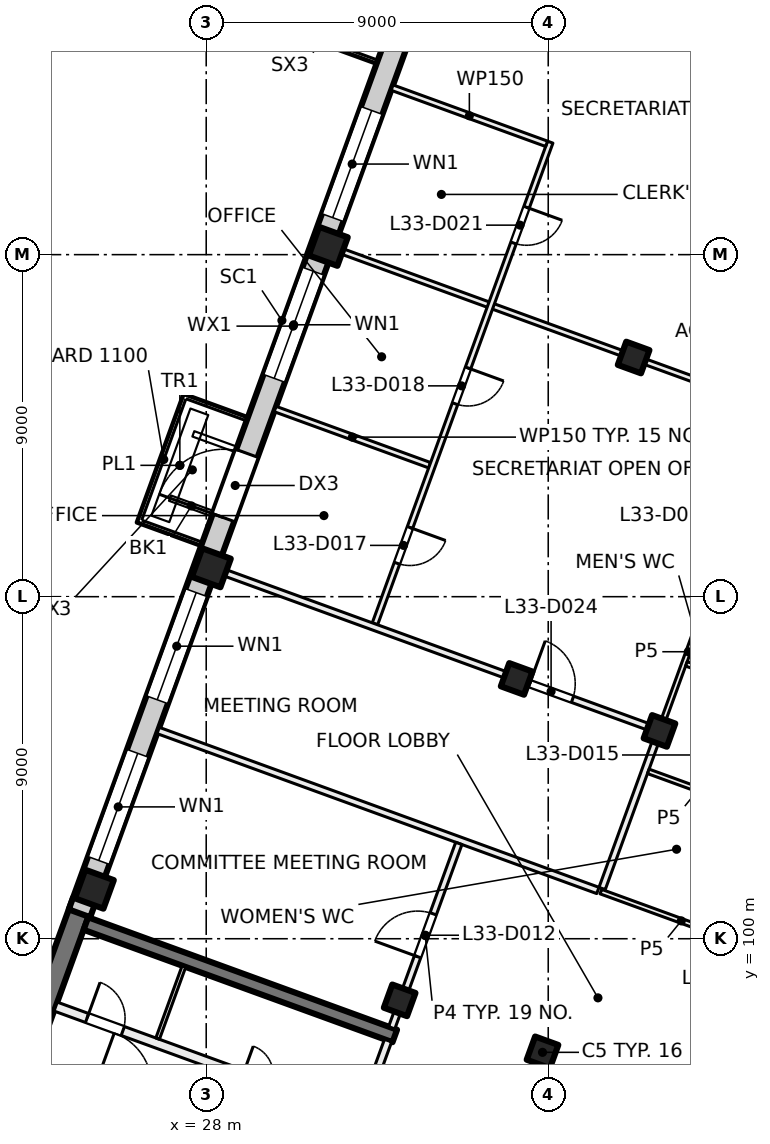
"""IFC4 building model, lengths in metres.
Left out: names, types, materials, properties, quantities, classifications, styles, units other than length and angle.
Written with IfcOpenShell. Run it as: python <this file> out.ifc"""

import sys

from ifc_helpers import new_model, si_unit, direction, frame, frame_2d, origin, origin_2d, place, context, subcontext, project, spatial, rectangle, extrude, element, fill, save


model = new_model("IFC4")
c1 = context("Model", 3, precision=1e-05, world=origin(), true_north=direction((0.0, 1.0)))
c2 = subcontext(c1, "Body", "Model", "MODEL_VIEW")
j1 = project(units=[si_unit("LENGTHUNIT", "METRE"), si_unit("PLANEANGLEUNIT", "RADIAN")], contexts=[c1])
p1 = place(None, origin())
s1 = spatial("IfcSite", under=j1, at=p1, CompositionType="ELEMENT")
p2 = place(p1, origin())
s2 = spatial("IfcBuilding", under=s1, at=p2, CompositionType="ELEMENT")
p3 = place(p2, frame((0.0, 0.0, 142.5)))
s3 = spatial("IfcBuildingStorey", under=s2, at=p3, CompositionType="ELEMENT", Elevation=142.5)
for number, where, z_axis, x_axis in (
    (1, (39.927, 105.468, 0.0), (0.0, 0.0, 1.0), (-0.342, -0.94, 0.0)),
    (2, (36.849, 97.011, 0.0), (0.0, 0.0, 1.0), (-0.342, -0.94, 0.0)),
    (3, (39.247, 115.293, 0.0), (0.0, 0.0, 1.0), (-0.342, -0.94, 0.0)),
    (4, (36.169, 106.836, 0.0), (0.0, 0.0, 1.0), (-0.342, -0.94, 0.0)),
    (5, (33.091, 98.379, 0.0), (0.0, 0.0, 1.0), (-0.342, -0.94, 0.0)),
):
    element("IfcColumn", number, at=place(p3, frame(where, z_axis=z_axis, x_axis=x_axis)), inside=s3, PredefinedType="COLUMN", context=c2, shape_type="SweptSolid", body=[
        extrude(rectangle(XDim=0.65, YDim=0.65, at=origin_2d()), origin(), (0.0, 0.0, 1.0), 4.0),
    ])
for number, where, z_axis, x_axis in (
    (6, (31.212, 118.218, 0.0), (0.0, 0.0, 1.0), (-0.342, -0.94, 0.0)),
    (7, (28.134, 109.76, 0.0), (0.0, 0.0, 1.0), (-0.342, -0.94, 0.0)),
    (8, (25.056, 101.303, 0.0), (0.0, 0.0, 1.0), (-0.342, -0.94, 0.0)),
):
    element("IfcColumn", number, at=place(p3, frame(where, z_axis=z_axis, x_axis=x_axis)), inside=s3, PredefinedType="COLUMN", context=c2, shape_type="SweptSolid", body=[
        extrude(rectangle(XDim=0.8, YDim=0.8, at=origin_2d()), origin(), (0.0, 0.0, 1.0), 4.0),
    ])
p4 = place(p3, frame((21.694, 92.577, 0.0), z_axis=(0.0, 0.0, 1.0), x_axis=(0.342010253184, 0.939696220444, 0.0)))
e9 = element("IfcWall", 9, at=p4, inside=s3, PredefinedType="SHEAR", context=c2, shape_type="SweptSolid", body=[
    extrude(rectangle(XDim=8.95, YDim=0.55, at=frame_2d((4.475, 0.0))), origin(), (0.0, 0.0, 1.0), 4.0),
])
p5 = place(p3, frame((32.962, 97.441, 0.0), z_axis=(0.0, 0.0, 1.0), x_axis=(-0.939689545667, 0.342028592028, 0.0)))
e10 = element("IfcWall", 10, at=p5, inside=s3, PredefinedType="SHEAR", context=c2, shape_type="SweptSolid", body=[
    extrude(rectangle(XDim=8.65, YDim=0.35, at=frame_2d((4.325, 0.0))), origin(), (0.0, 0.0, 1.0), 4.0),
])
p6 = place(p3, frame((24.666, 100.669, 0.0), z_axis=(0.0, 0.0, 1.0), x_axis=(0.34201964167, 0.939692803373, 0.0)))
e11 = element("IfcWall", 11, at=p6, inside=s3, PredefinedType="SOLIDWALL", context=c2, shape_type="SweptSolid", body=[
    extrude(rectangle(XDim=32.884, YDim=0.6, at=frame_2d((16.442, 0.0))), origin(), (0.0, 0.0, 1.0), 3.625),
])
p7 = place(p6, frame((1.48, 0.0, 0.9)))
e12 = element("IfcOpeningElement", 12, at=p7, cuts=e11, PredefinedType="OPENING", context=c2, shape_type="SweptSolid", body=[
    extrude(rectangle(XDim=3.0, YDim=2.4, at=frame_2d((1.5, 1.2))), frame((0.0, 0.31, 0.0), z_axis=(0.0, -1.0, 0.0), x_axis=(1.0, 0.0, 0.0)), (0.0, 0.0, 1.0), 0.62),
])
p8 = place(p6, frame((5.98, 0.0, 0.9)))
e13 = element("IfcOpeningElement", 13, at=p8, cuts=e11, PredefinedType="OPENING", context=c2, shape_type="SweptSolid", body=[
    extrude(rectangle(XDim=3.0, YDim=2.4, at=frame_2d((1.5, 1.2))), frame((0.0, 0.31, 0.0), z_axis=(0.0, -1.0, 0.0), x_axis=(1.0, 0.0, 0.0)), (0.0, 0.0, 1.0), 0.62),
])
p9 = place(p6, frame((11.08, 0.0, 0.0)))
e14 = element("IfcOpeningElement", 14, at=p9, cuts=e11, PredefinedType="OPENING", context=c2, shape_type="SweptSolid", body=[
    extrude(rectangle(XDim=1.8, YDim=2.4, at=frame_2d((0.9, 1.2))), frame((0.0, 0.31, 0.0), z_axis=(0.0, -1.0, 0.0), x_axis=(1.0, 0.0, 0.0)), (0.0, 0.0, 1.0), 0.62),
])
p10 = place(p6, frame((14.98, 0.0, 0.9)))
e15 = element("IfcOpeningElement", 15, at=p10, cuts=e11, PredefinedType="OPENING", context=c2, shape_type="SweptSolid", body=[
    extrude(rectangle(XDim=3.0, YDim=2.4, at=frame_2d((1.5, 1.2))), frame((0.0, 0.31, 0.0), z_axis=(0.0, -1.0, 0.0), x_axis=(1.0, 0.0, 0.0)), (0.0, 0.0, 1.0), 0.62),
])
p11 = place(p6, frame((19.48, 0.0, 0.9)))
e16 = element("IfcOpeningElement", 16, at=p11, cuts=e11, PredefinedType="OPENING", context=c2, shape_type="SweptSolid", body=[
    extrude(rectangle(XDim=3.0, YDim=2.4, at=frame_2d((1.5, 1.2))), frame((0.0, 0.31, 0.0), z_axis=(0.0, -1.0, 0.0), x_axis=(1.0, 0.0, 0.0)), (0.0, 0.0, 1.0), 0.62),
])
p12 = place(p6, frame((24.58, 0.0, 0.0)))
e17 = element("IfcOpeningElement", 17, at=p12, cuts=e11, PredefinedType="OPENING", context=c2, shape_type="SweptSolid", body=[
    extrude(rectangle(XDim=1.8, YDim=2.4, at=frame_2d((0.9, 1.2))), frame((0.0, 0.31, 0.0), z_axis=(0.0, -1.0, 0.0), x_axis=(1.0, 0.0, 0.0)), (0.0, 0.0, 1.0), 0.62),
])
p13 = place(p6, frame((28.48, 0.0, 0.9)))
e18 = element("IfcOpeningElement", 18, at=p13, cuts=e11, PredefinedType="OPENING", context=c2, shape_type="SweptSolid", body=[
    extrude(rectangle(XDim=3.0, YDim=2.4, at=frame_2d((1.5, 1.2))), frame((0.0, 0.31, 0.0), z_axis=(0.0, -1.0, 0.0), x_axis=(1.0, 0.0, 0.0)), (0.0, 0.0, 1.0), 0.62),
])
p14 = place(p3, frame((31.459, 93.678, 0.0), z_axis=(0.0, 0.0, 1.0), x_axis=(0.341985870128, 0.939705094502, 0.0)))
e19 = element("IfcWall", 19, at=p14, inside=s3, PredefinedType="PARTITIONING", context=c2, shape_type="SweptSolid", body=[
    extrude(rectangle(XDim=3.875, YDim=0.2, at=frame_2d((1.938, 0.0))), origin(), (0.0, 0.0, 1.0), 3.625),
])
p15 = place(p14, frame((0.3, 0.0, 0.0)))
e20 = element("IfcOpeningElement", 20, at=p15, cuts=e19, PredefinedType="OPENING", context=c2, shape_type="SweptSolid", body=[
    extrude(rectangle(XDim=1.2, YDim=2.1, at=frame_2d((0.6, 1.05))), frame((0.0, 0.11, 0.0), z_axis=(0.0, -1.0, 0.0), x_axis=(1.0, 0.0, 0.0)), (0.0, 0.0, 1.0), 0.22),
])
p16 = place(p3, frame((23.483, 96.688, 0.0), z_axis=(0.0, 0.0, 1.0), x_axis=(0.939691007314, -0.342024576271, 0.0)))
e21 = element("IfcWall", 21, at=p16, inside=s3, PredefinedType="PARTITIONING", context=c2, shape_type="SweptSolid", body=[
    extrude(rectangle(XDim=8.425, YDim=0.2, at=frame_2d((4.212, 0.0))), origin(), (0.0, 0.0, 1.0), 3.625),
])
p17 = place(p16, frame((1.688, 0.0, 0.0)))
e22 = element("IfcOpeningElement", 22, at=p17, cuts=e21, PredefinedType="OPENING", context=c2, shape_type="SweptSolid", body=[
    extrude(rectangle(XDim=1.5, YDim=2.1, at=frame_2d((0.75, 1.05))), frame((0.0, 0.11, 0.0), z_axis=(0.0, -1.0, 0.0), x_axis=(1.0, 0.0, 0.0)), (0.0, 0.0, 1.0), 0.22),
])
p18 = place(p3, frame((24.039, 98.215, 0.0), z_axis=(0.0, 0.0, 1.0), x_axis=(0.939687617333, -0.342033889887, 0.0)))
e23 = element("IfcWall", 23, at=p18, inside=s3, PredefinedType="PARTITIONING", context=c2, shape_type="SweptSolid", body=[
    extrude(rectangle(XDim=8.425, YDim=0.25, at=frame_2d((4.212, 0.0))), origin(), (0.0, 0.0, 1.0), 3.625),
])
p19 = place(p18, frame((5.242, 0.0, 0.0)))
e24 = element("IfcOpeningElement", 24, at=p19, cuts=e23, PredefinedType="OPENING", context=c2, shape_type="SweptSolid", body=[
    extrude(rectangle(XDim=0.8, YDim=2.1, at=frame_2d((0.4, 1.05))), frame((0.0, 0.135, 0.0), z_axis=(0.0, -1.0, 0.0), x_axis=(1.0, 0.0, 0.0)), (0.0, 0.0, 1.0), 0.27),
])
p20 = place(p18, frame((0.88, 0.0, 0.0)))
e25 = element("IfcOpeningElement", 25, at=p20, cuts=e23, PredefinedType="OPENING", context=c2, shape_type="SweptSolid", body=[
    extrude(rectangle(XDim=1.0, YDim=2.1, at=frame_2d((0.5, 1.05))), frame((0.0, 0.135, 0.0), z_axis=(0.0, -1.0, 0.0), x_axis=(1.0, 0.0, 0.0)), (0.0, 0.0, 1.0), 0.27),
])
p21 = place(p3, frame((26.722, 97.371, 0.0), z_axis=(0.0, 0.0, 1.0), x_axis=(0.342004391282, 0.939698353911, 0.0)))
e26 = element("IfcWall", 26, at=p21, inside=s3, PredefinedType="PARTITIONING", context=c2, shape_type="SweptSolid", body=[
    extrude(rectangle(XDim=2.025, YDim=0.1, at=frame_2d((1.013, 0.0))), origin(), (0.0, 0.0, 1.0), 3.625),
])
p22 = place(p3, frame((26.736, 105.48, 0.0), z_axis=(0.0, 0.0, 1.0), x_axis=(0.939721611154, -0.341940482438, 0.0)))
e27 = element("IfcWall", 27, at=p22, inside=s3, PredefinedType="PARTITIONING", context=c2, shape_type="SweptSolid", body=[
    extrude(rectangle(XDim=12.312, YDim=0.175, at=frame_2d((6.156, 0.0))), origin(), (0.0, 0.0, 1.0), 3.625),
])
p23 = place(p3, frame((29.814, 113.938, 0.0), z_axis=(0.0, 0.0, 1.0), x_axis=(0.93973078783, -0.341915262023, 0.0)))
e28 = element("IfcWall", 28, at=p23, inside=s3, PredefinedType="PARTITIONING", context=c2, shape_type="SweptSolid", body=[
    extrude(rectangle(XDim=4.326, YDim=0.15, at=frame_2d((2.163, 0.0))), origin(), (0.0, 0.0, 1.0), 3.625),
])
p24 = place(p3, frame((31.353, 118.166, 0.0), z_axis=(0.0, 0.0, 1.0), x_axis=(0.939701413127, -0.341995985602, 0.0)))
e29 = element("IfcWall", 29, at=p24, inside=s3, PredefinedType="PARTITIONING", context=c2, shape_type="SweptSolid", body=[
    extrude(rectangle(XDim=17.05, YDim=0.15, at=frame_2d((8.525, 0.0))), origin(), (0.0, 0.0, 1.0), 3.625),
])
p25 = place(p3, frame((37.053, 120.96, 0.0), z_axis=(0.0, 0.0, 1.0), x_axis=(-0.342023551531, -0.939691380293, 0.0)))
e30 = element("IfcWall", 30, at=p25, inside=s3, PredefinedType="PARTITIONING", context=c2, shape_type="SweptSolid", body=[
    extrude(rectangle(XDim=13.488, YDim=0.15, at=frame_2d((6.744, 0.0))), origin(), (0.0, 0.0, 1.0), 3.625),
])
p26 = place(p25, frame((10.791, 0.0, 0.0)))
e31 = element("IfcOpeningElement", 31, at=p26, cuts=e30, PredefinedType="OPENING", context=c2, shape_type="SweptSolid", body=[
    extrude(rectangle(XDim=1.0, YDim=2.1, at=frame_2d((0.5, 1.05))), frame((0.0, 0.085, 0.0), z_axis=(0.0, -1.0, 0.0), x_axis=(1.0, 0.0, 0.0)), (0.0, 0.0, 1.0), 0.17),
])
p27 = place(p25, frame((6.324, 0.0, 0.0)))
e32 = element("IfcOpeningElement", 32, at=p27, cuts=e30, PredefinedType="OPENING", context=c2, shape_type="SweptSolid", body=[
    extrude(rectangle(XDim=1.0, YDim=2.1, at=frame_2d((0.5, 1.05))), frame((0.0, 0.085, 0.0), z_axis=(0.0, -1.0, 0.0), x_axis=(1.0, 0.0, 0.0)), (0.0, 0.0, 1.0), 0.17),
])
p28 = place(p25, frame((1.824, 0.0, 0.0)))
e33 = element("IfcOpeningElement", 33, at=p28, cuts=e30, PredefinedType="OPENING", context=c2, shape_type="SweptSolid", body=[
    extrude(rectangle(XDim=1.0, YDim=2.1, at=frame_2d((0.5, 1.05))), frame((0.0, 0.085, 0.0), z_axis=(0.0, -1.0, 0.0), x_axis=(1.0, 0.0, 0.0)), (0.0, 0.0, 1.0), 0.17),
])
p29 = place(p3, frame((32.892, 122.395, 0.0), z_axis=(0.0, 0.0, 1.0), x_axis=(0.93973078783, -0.341915262023, 0.0)))
e34 = element("IfcWall", 34, at=p29, inside=s3, PredefinedType="PARTITIONING", context=c2, shape_type="SweptSolid", body=[
    extrude(rectangle(XDim=4.326, YDim=0.15, at=frame_2d((2.163, 0.0))), origin(), (0.0, 0.0, 1.0), 3.625),
])
p30 = place(p3, frame((32.881, 97.657, 0.0), z_axis=(0.0, 0.0, 1.0), x_axis=(0.342058204353, 0.939678766832, 0.0)))
e35 = element("IfcWall", 35, at=p30, inside=s3, PredefinedType="PARTITIONING", context=c2, shape_type="SweptSolid", body=[
    extrude(rectangle(XDim=5.163, YDim=0.175, at=frame_2d((2.581, 0.0))), origin(), (0.0, 0.0, 1.0), 3.625),
])
p31 = place(p30, frame((1.991, 0.0, 0.0)))
e36 = element("IfcOpeningElement", 36, at=p31, cuts=e35, PredefinedType="OPENING", context=c2, shape_type="SweptSolid", body=[
    extrude(rectangle(XDim=1.2, YDim=2.1, at=frame_2d((0.6, 1.05))), frame((0.0, 0.097, 0.0), z_axis=(0.0, -1.0, 0.0), x_axis=(1.0, 0.0, 0.0)), (0.0, 0.0, 1.0), 0.195),
])
p32 = place(p3, frame((38.385, 101.24, 0.0), z_axis=(0.0, 0.0, 1.0), x_axis=(0.939711088937, -0.341969398235, 0.0)))
e37 = element("IfcWall", 37, at=p32, inside=s3, PredefinedType="PARTITIONING", context=c2, shape_type="SweptSolid", body=[
    extrude(rectangle(XDim=4.503, YDim=0.125, at=frame_2d((2.252, 0.0))), origin(), (0.0, 0.0, 1.0), 3.625),
])
p33 = place(p3, frame((38.418, 101.322, 0.0), z_axis=(0.0, 0.0, 1.0), x_axis=(0.341987815327, 0.939704386585, 0.0)))
e38 = element("IfcWall", 38, at=p33, inside=s3, PredefinedType="PARTITIONING", context=c2, shape_type="SweptSolid", body=[
    extrude(rectangle(XDim=4.325, YDim=0.175, at=frame_2d((2.162, 0.0))), origin(), (0.0, 0.0, 1.0), 3.625),
])
p34 = place(p3, frame((39.926, 105.465, 0.0), z_axis=(0.0, 0.0, 1.0), x_axis=(0.342263852659, 0.93960388205, 0.0)))
e39 = element("IfcWall", 39, at=p34, inside=s3, PredefinedType="PARTITIONING", context=c2, shape_type="SweptSolid", body=[
    extrude(rectangle(XDim=4.441, YDim=0.125, at=frame_2d((2.221, 0.0))), origin(), (0.0, 0.0, 1.0), 3.625),
])
p35 = place(p3, frame((28.275, 109.709, 0.0), z_axis=(0.0, 0.0, 1.0), x_axis=(0.939698441386, -0.342004150936, 0.0)))
e40 = element("IfcWall", 40, at=p35, inside=s3, PredefinedType="PARTITIONING", context=c2, shape_type="SweptSolid", body=[
    extrude(rectangle(XDim=12.312, YDim=0.175, at=frame_2d((6.156, 0.0))), origin(), (0.0, 0.0, 1.0), 3.625),
])
p36 = place(p35, frame((8.765, 0.0, 0.0)))
e41 = element("IfcOpeningElement", 41, at=p36, cuts=e40, PredefinedType="OPENING", context=c2, shape_type="SweptSolid", body=[
    extrude(rectangle(XDim=1.2, YDim=2.1, at=frame_2d((0.6, 1.05))), frame((0.0, 0.097, 0.0), z_axis=(0.0, -1.0, 0.0), x_axis=(1.0, 0.0, 0.0)), (0.0, 0.0, 1.0), 0.195),
])
p37 = place(p3, frame((42.264, 103.446, 0.0), z_axis=(0.0, 0.0, 1.0), x_axis=(-0.939640574808, 0.342163104635, 0.0)))
e42 = element("IfcWall", 42, at=p37, inside=s3, PredefinedType="PARTITIONING", context=c2, shape_type="SweptSolid", body=[
    extrude(rectangle(XDim=2.8, YDim=0.125, at=frame_2d((1.4, 0.0))), origin(), (0.0, 0.0, 1.0), 3.625),
])
p38 = place(p3, frame((43.29, 106.266, 0.0), z_axis=(0.0, 0.0, 1.0), x_axis=(-0.939601484935, 0.342270433294, 0.0)))
e43 = element("IfcWall", 43, at=p38, inside=s3, PredefinedType="PARTITIONING", context=c2, shape_type="SweptSolid", body=[
    extrude(rectangle(XDim=2.825, YDim=0.125, at=frame_2d((1.412, 0.0))), origin(), (0.0, 0.0, 1.0), 3.625),
])
p39 = place(p3, frame((46.084, 122.383, 0.0), z_axis=(0.0, 0.0, 1.0), x_axis=(-0.939703144457, 0.341991228392, 0.0)))
e44 = element("IfcWall", 44, at=p39, inside=s3, PredefinedType="PARTITIONING", context=c2, shape_type="SweptSolid", body=[
    extrude(rectangle(XDim=12.401, YDim=0.15, at=frame_2d((6.2, 0.0))), origin(), (0.0, 0.0, 1.0), 3.625),
])
p40 = place(p7, origin())
e45 = element("IfcWindow", 45, at=p40, inside=s3, PartitioningType="SINGLE_PANEL", PredefinedType="WINDOW", context=c2, shape_type="SweptSolid", body=[
    extrude(rectangle(XDim=3.0, YDim=2.4, at=frame_2d((1.5, 1.2))), frame((0.0, 0.03, 0.0), z_axis=(0.0, -1.0, 0.0), x_axis=(1.0, 0.0, 0.0)), (0.0, 0.0, 1.0), 0.06),
])
fill(e12, e45)
p41 = place(p8, origin())
e46 = element("IfcWindow", 46, at=p41, inside=s3, PartitioningType="SINGLE_PANEL", PredefinedType="WINDOW", context=c2, shape_type="SweptSolid", body=[
    extrude(rectangle(XDim=3.0, YDim=2.4, at=frame_2d((1.5, 1.2))), frame((0.0, 0.03, 0.0), z_axis=(0.0, -1.0, 0.0), x_axis=(1.0, 0.0, 0.0)), (0.0, 0.0, 1.0), 0.06),
])
fill(e13, e46)
p42 = place(p9, origin())
e47 = element("IfcDoor", 47, at=p42, inside=s3, OperationType="DOUBLE_DOOR_SINGLE_SWING", PredefinedType="DOOR", context=c2, shape_type="SweptSolid", body=[
    extrude(rectangle(XDim=1.8, YDim=2.4, at=frame_2d((0.9, 1.2))), frame((0.0, 0.025, 0.0), z_axis=(0.0, -1.0, 0.0), x_axis=(1.0, 0.0, 0.0)), (0.0, 0.0, 1.0), 0.05),
])
fill(e14, e47)
p43 = place(p10, origin())
e48 = element("IfcWindow", 48, at=p43, inside=s3, PartitioningType="SINGLE_PANEL", PredefinedType="WINDOW", context=c2, shape_type="SweptSolid", body=[
    extrude(rectangle(XDim=3.0, YDim=2.4, at=frame_2d((1.5, 1.2))), frame((0.0, 0.03, 0.0), z_axis=(0.0, -1.0, 0.0), x_axis=(1.0, 0.0, 0.0)), (0.0, 0.0, 1.0), 0.06),
])
fill(e15, e48)
p44 = place(p11, origin())
e49 = element("IfcWindow", 49, at=p44, inside=s3, PartitioningType="SINGLE_PANEL", PredefinedType="WINDOW", context=c2, shape_type="SweptSolid", body=[
    extrude(rectangle(XDim=3.0, YDim=2.4, at=frame_2d((1.5, 1.2))), frame((0.0, 0.03, 0.0), z_axis=(0.0, -1.0, 0.0), x_axis=(1.0, 0.0, 0.0)), (0.0, 0.0, 1.0), 0.06),
])
fill(e16, e49)
p45 = place(p20, origin())
e50 = element("IfcDoor", 50, at=p45, inside=s3, OperationType="SINGLE_SWING_RIGHT", PredefinedType="DOOR", context=c2, shape_type="SweptSolid", body=[
    extrude(rectangle(XDim=1.0, YDim=2.1, at=frame_2d((0.5, 1.05))), frame((0.0, 0.025, 0.0), z_axis=(0.0, -1.0, 0.0), x_axis=(1.0, 0.0, 0.0)), (0.0, 0.0, 1.0), 0.05),
])
fill(e25, e50)
p46 = place(p31, origin())
e51 = element("IfcDoor", 51, at=p46, inside=s3, OperationType="DOUBLE_DOOR_SINGLE_SWING", PredefinedType="DOOR", context=c2, shape_type="SweptSolid", body=[
    extrude(rectangle(XDim=1.2, YDim=2.1, at=frame_2d((0.6, 1.05))), frame((0.0, 0.025, 0.0), z_axis=(0.0, -1.0, 0.0), x_axis=(1.0, 0.0, 0.0)), (0.0, 0.0, 1.0), 0.05),
])
fill(e36, e51)
p47 = place(p26, origin())
e52 = element("IfcDoor", 52, at=p47, inside=s3, OperationType="SINGLE_SWING_LEFT", PredefinedType="DOOR", context=c2, shape_type="SweptSolid", body=[
    extrude(rectangle(XDim=1.0, YDim=2.1, at=frame_2d((0.5, 1.05))), frame((0.0, 0.025, 0.0), z_axis=(0.0, -1.0, 0.0), x_axis=(1.0, 0.0, 0.0)), (0.0, 0.0, 1.0), 0.05),
])
fill(e31, e52)
p48 = place(p27, origin())
e53 = element("IfcDoor", 53, at=p48, inside=s3, OperationType="SINGLE_SWING_RIGHT", PredefinedType="DOOR", context=c2, shape_type="SweptSolid", body=[
    extrude(rectangle(XDim=1.0, YDim=2.1, at=frame_2d((0.5, 1.05))), frame((0.0, 0.025, 0.0), z_axis=(0.0, -1.0, 0.0), x_axis=(1.0, 0.0, 0.0)), (0.0, 0.0, 1.0), 0.05),
])
fill(e32, e53)
p49 = place(p28, origin())
e54 = element("IfcDoor", 54, at=p49, inside=s3, OperationType="SINGLE_SWING_LEFT", PredefinedType="DOOR", context=c2, shape_type="SweptSolid", body=[
    extrude(rectangle(XDim=1.0, YDim=2.1, at=frame_2d((0.5, 1.05))), frame((0.0, 0.025, 0.0), z_axis=(0.0, -1.0, 0.0), x_axis=(1.0, 0.0, 0.0)), (0.0, 0.0, 1.0), 0.05),
])
fill(e33, e54)
p50 = place(p36, origin())
e55 = element("IfcDoor", 55, at=p50, inside=s3, OperationType="DOUBLE_DOOR_SINGLE_SWING", PredefinedType="DOOR", context=c2, shape_type="SweptSolid", body=[
    extrude(rectangle(XDim=1.2, YDim=2.1, at=frame_2d((0.6, 1.05))), frame((0.0, 0.025, 0.0), z_axis=(0.0, -1.0, 0.0), x_axis=(1.0, 0.0, 0.0)), (0.0, 0.0, 1.0), 0.05),
])
fill(e41, e55)
save(model, sys.argv[1])
